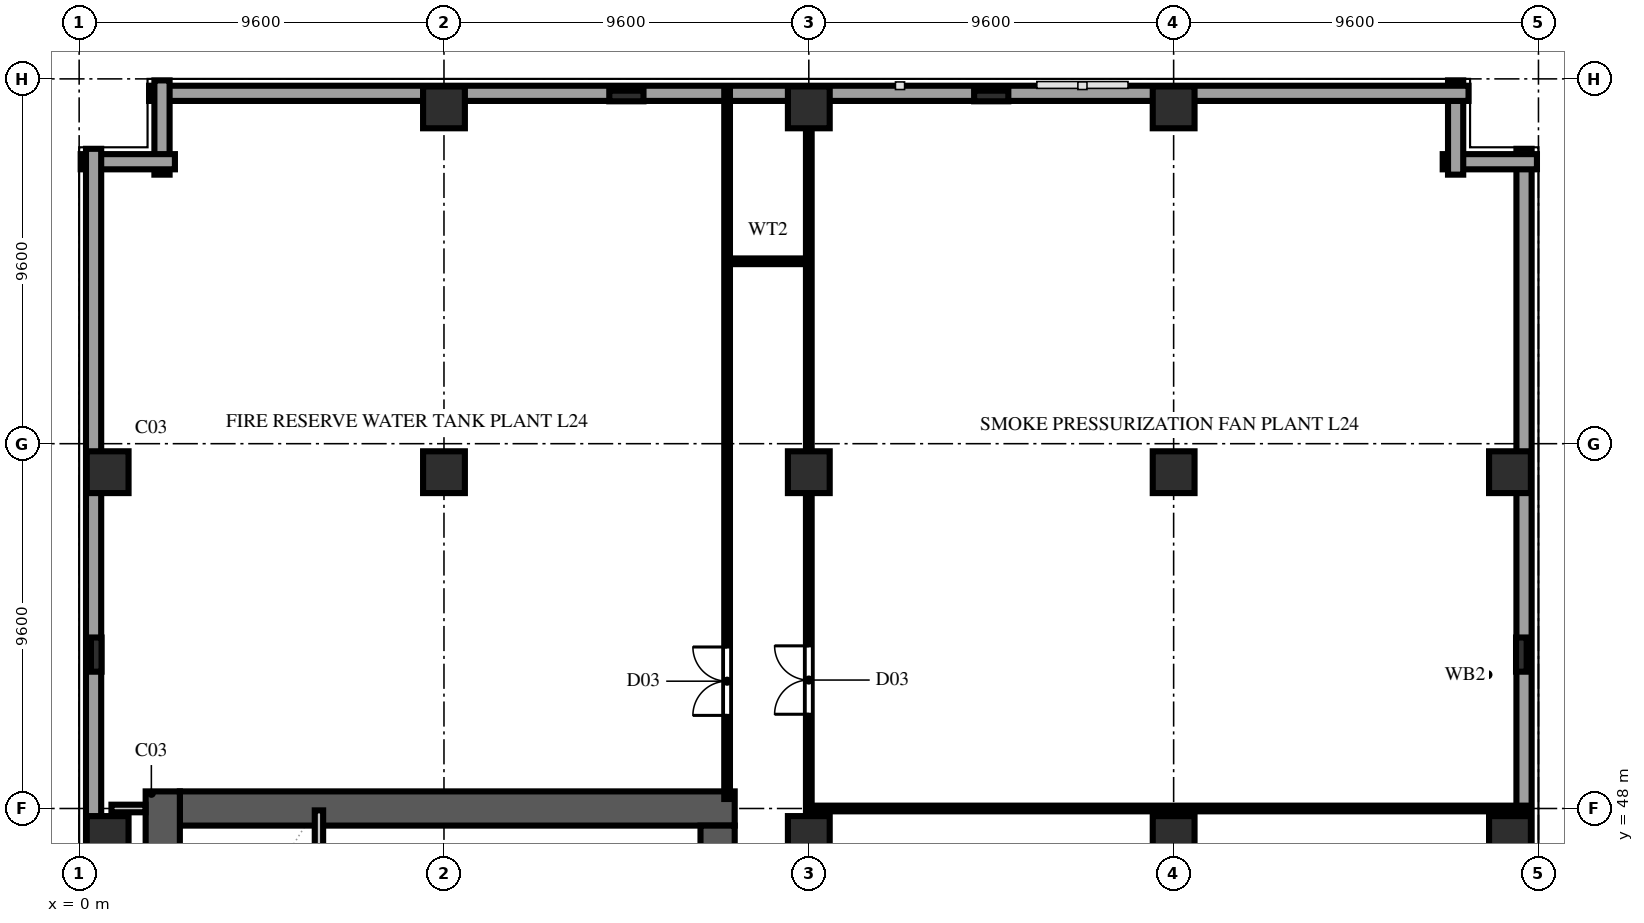
"""IFC4 building model, lengths in metres.
Left out: names, types, materials, properties, quantities, classifications, styles, units other than length and angle.
Written with IfcOpenShell. Run it as: python <this file> out.ifc"""

import sys

from ifc_helpers import new_model, si_unit, direction, frame, frame_2d, origin, origin_2d, place, context, subcontext, project, spatial, rectangle, extrude, element, fill, save


model = new_model("IFC4")
c1 = context("Model", 3, precision=1e-05, world=origin(), true_north=direction((0.0, 1.0)))
c2 = subcontext(c1, "Body", "Model", "MODEL_VIEW")
j1 = project(units=[si_unit("LENGTHUNIT", "METRE"), si_unit("PLANEANGLEUNIT", "RADIAN")], contexts=[c1])
p1 = place(None, origin())
s1 = spatial("IfcSite", under=j1, at=p1, CompositionType="ELEMENT")
p2 = place(p1, origin())
s2 = spatial("IfcBuilding", under=s1, at=p2, CompositionType="ELEMENT")
p3 = place(p2, frame((0.0, 0.0, 96.4)))
s3 = spatial("IfcBuildingStorey", under=s2, at=p3, CompositionType="ELEMENT", Elevation=96.4)
p4 = place(p3, frame((2.65, 48.0, 0.0), z_axis=(0.0, 0.0, 1.0), x_axis=(1.0, 0.0, 0.0)))
e1 = element("IfcWall", 1, at=p4, inside=s3, PredefinedType="SHEAR", context=c2, shape_type="SweptSolid", body=[
    extrude(rectangle(XDim=14.6, YDim=0.9, at=frame_2d((7.3, 0.0))), origin(), (0.0, 0.0, 1.0), 4.74),
])
p5 = place(p3, frame((2.2, 9.15, 0.0), z_axis=(0.0, 0.0, 1.0), x_axis=(0.0, 1.0, 0.0)))
e2 = element("IfcWall", 2, at=p5, inside=s3, PredefinedType="SHEAR", context=c2, shape_type="SweptSolid", body=[
    extrude(rectangle(XDim=39.3, YDim=0.9, at=frame_2d((19.65, 0.0))), origin(), (0.0, 0.0, 1.0), 4.74),
])
p6 = place(p3, frame((16.8, 36.4, 0.0), z_axis=(0.0, 0.0, 1.0), x_axis=(0.0, 1.0, 0.0)))
e3 = element("IfcWall", 3, at=p6, inside=s3, PredefinedType="SHEAR", context=c2, shape_type="SweptSolid", body=[
    extrude(rectangle(XDim=11.15, YDim=0.9, at=frame_2d((5.575, 0.0))), origin(), (0.0, 0.0, 1.0), 4.74),
])
p7 = place(p6, frame((9.2, 0.0, 0.0)))
e4 = element("IfcOpeningElement", 4, at=p7, cuts=e3, PredefinedType="OPENING", context=c2, shape_type="SweptSolid", body=[
    extrude(rectangle(XDim=0.95, YDim=2.15, at=frame_2d((0.475, 1.075))), frame((0.0, 0.462, 0.0), z_axis=(0.0, -1.0, 0.0), x_axis=(1.0, 0.0, 0.0)), (0.0, 0.0, 1.0), 0.924),
])
for number, where, z_axis, x_axis in (
    (5, (0.75, 47.25, 0.0), (0.0, 0.0, 1.0), (1.0, 0.0, 0.0)),
    (6, (0.75, 56.85, 0.0), (0.0, 0.0, 1.0), (1.0, 0.0, 0.0)),
    (7, (9.6, 56.85, 0.0), (0.0, 0.0, 1.0), (1.0, 0.0, 0.0)),
    (8, (9.6, 66.45, 0.0), (0.0, 0.0, 1.0), (1.0, 0.0, 0.0)),
    (9, (19.2, 47.25, 0.0), (0.0, 0.0, 1.0), (1.0, 0.0, 0.0)),
    (10, (19.2, 56.85, 0.0), (0.0, 0.0, 1.0), (1.0, 0.0, 0.0)),
    (11, (19.2, 66.45, 0.0), (0.0, 0.0, 1.0), (1.0, 0.0, 0.0)),
    (12, (28.8, 47.25, 0.0), (0.0, 0.0, 1.0), (1.0, 0.0, 0.0)),
    (13, (28.8, 56.85, 0.0), (0.0, 0.0, 1.0), (1.0, 0.0, 0.0)),
    (14, (28.8, 66.45, 0.0), (0.0, 0.0, 1.0), (1.0, 0.0, 0.0)),
    (15, (37.65, 47.25, 0.0), (0.0, 0.0, 1.0), (1.0, 0.0, 0.0)),
    (16, (37.65, 56.85, 0.0), (0.0, 0.0, 1.0), (1.0, 0.0, 0.0)),
):
    element("IfcColumn", number, at=place(p3, frame(where, z_axis=z_axis, x_axis=x_axis)), inside=s3, PredefinedType="COLUMN", context=c2, shape_type="SweptSolid", body=[
        extrude(rectangle(XDim=1.1, YDim=1.1, at=origin_2d()), origin(), (0.0, 0.0, 1.0), 5.0),
    ])
for number, where, z_axis, x_axis in (
    (17, (0.45, 52.05, 0.0), (0.0, 0.0, 1.0), (0.0, 1.0, 0.0)),
    (18, (14.4, 66.75, 0.0), (0.0, 0.0, 1.0), (1.0, 0.0, 0.0)),
    (19, (24.0, 66.75, 0.0), (0.0, 0.0, 1.0), (1.0, 0.0, 0.0)),
    (20, (37.95, 52.05, 0.0), (0.0, 0.0, 1.0), (0.0, 1.0, 0.0)),
):
    element("IfcColumn", number, at=place(p3, frame(where, z_axis=z_axis, x_axis=x_axis)), inside=s3, PredefinedType="PILASTER", context=c2, shape_type="SweptSolid", body=[
        extrude(rectangle(XDim=0.9, YDim=0.28, at=origin_2d()), origin(), (0.0, 0.0, 1.0), 5.0),
    ])
p8 = place(p3, frame((38.02, 37.68, 0.0), z_axis=(0.0, 0.0, 1.0), x_axis=(0.0, 1.0, 0.0)))
e21 = element("IfcWall", 21, at=p8, inside=s3, PredefinedType="SOLIDWALL", context=c2, shape_type="SweptSolid", body=[
    extrude(rectangle(XDim=27.68, YDim=0.4, at=frame_2d((13.84, 0.0))), origin(), (0.0, 0.0, 1.0), 4.74),
])
p9 = place(p3, frame((38.36, 65.02, 0.0), z_axis=(0.0, 0.0, 1.0), x_axis=(-1.0, 0.0, 0.0)))
e22 = element("IfcWall", 22, at=p9, inside=s3, PredefinedType="SOLIDWALL", context=c2, shape_type="SweptSolid", body=[
    extrude(rectangle(XDim=2.48, YDim=0.4, at=frame_2d((1.24, 0.0))), origin(), (0.0, 0.0, 1.0), 4.74),
])
p10 = place(p3, frame((36.22, 64.68, 0.0), z_axis=(0.0, 0.0, 1.0), x_axis=(0.0, 1.0, 0.0)))
e23 = element("IfcWall", 23, at=p10, inside=s3, PredefinedType="SOLIDWALL", context=c2, shape_type="SweptSolid", body=[
    extrude(rectangle(XDim=2.48, YDim=0.4, at=frame_2d((1.24, 0.0))), origin(), (0.0, 0.0, 1.0), 4.74),
])
p11 = place(p3, frame((36.56, 66.82, 0.0), z_axis=(0.0, 0.0, 1.0), x_axis=(-1.0, 0.0, 0.0)))
e24 = element("IfcWall", 24, at=p11, inside=s3, PredefinedType="SOLIDWALL", context=c2, shape_type="SweptSolid", body=[
    extrude(rectangle(XDim=34.72, YDim=0.4, at=frame_2d((17.36, 0.0))), origin(), (0.0, 0.0, 1.0), 4.74),
])
for number, where, z_axis, x_axis in (
    (25, (2.18, 67.16, 0.0), (0.0, 0.0, 1.0), (0.0, -1.0, 0.0)),
    (26, (2.52, 65.02, 0.0), (0.0, 0.0, 1.0), (-1.0, 0.0, 0.0)),
):
    element("IfcWall", number, at=place(p3, frame(where, z_axis=z_axis, x_axis=x_axis)), inside=s3, PredefinedType="SOLIDWALL", context=c2, shape_type="SweptSolid", body=[
        extrude(rectangle(XDim=2.48, YDim=0.4, at=frame_2d((1.24, 0.0))), origin(), (0.0, 0.0, 1.0), 4.74),
    ])
p12 = place(p3, frame((0.38, 65.36, 0.0), z_axis=(0.0, 0.0, 1.0), x_axis=(0.0, -1.0, 0.0)))
e27 = element("IfcWall", 27, at=p12, inside=s3, PredefinedType="SOLIDWALL", context=c2, shape_type="SweptSolid", body=[
    extrude(rectangle(XDim=63.52, YDim=0.4, at=frame_2d((31.76, 0.0))), origin(), (0.0, 0.0, 1.0), 4.74),
])
p13 = place(p3, frame((6.31, 40.14, 0.0), z_axis=(0.0, 0.0, 1.0), x_axis=(0.0, 1.0, 0.0)))
e28 = element("IfcWall", 28, at=p13, inside=s3, PredefinedType="SOLIDWALL", context=c2, shape_type="SweptSolid", body=[
    extrude(rectangle(XDim=7.81, YDim=0.22, at=frame_2d((3.905, 0.0))), origin(), (0.0, 0.0, 1.0), 4.74),
])
p14 = place(p3, frame((0.85, 48.0, 0.0), z_axis=(0.0, 0.0, 1.0), x_axis=(1.0, 0.0, 0.0)))
e29 = element("IfcWall", 29, at=p14, inside=s3, PredefinedType="SOLIDWALL", context=c2, shape_type="SweptSolid", body=[
    extrude(rectangle(XDim=0.895, YDim=0.2, at=frame_2d((0.448, 0.0))), origin(), (0.0, 0.0, 1.0), 4.74),
])
p15 = place(p3, frame((17.05, 62.4, 0.0), z_axis=(0.0, 0.0, 1.0), x_axis=(1.0, 0.0, 0.0)))
e30 = element("IfcWall", 30, at=p15, inside=s3, PredefinedType="PARTITIONING", context=c2, shape_type="SweptSolid", body=[
    extrude(rectangle(XDim=2.15, YDim=0.15, at=frame_2d((1.075, 0.0))), origin(), (0.0, 0.0, 1.0), 4.74),
])
p16 = place(p3, frame((19.2, 48.0, 0.0), z_axis=(0.0, 0.0, 1.0), x_axis=(1.0, 0.0, 0.0)))
e31 = element("IfcWall", 31, at=p16, inside=s3, PredefinedType="PARTITIONING", context=c2, shape_type="SweptSolid", body=[
    extrude(rectangle(XDim=18.98, YDim=0.15, at=frame_2d((9.49, 0.0))), origin(), (0.0, 0.0, 1.0), 4.74),
])
p17 = place(p3, frame((19.2, 9.98, 0.0), z_axis=(0.0, 0.0, 1.0), x_axis=(0.0, 1.0, 0.0)))
e32 = element("IfcWall", 32, at=p17, inside=s3, PredefinedType="PARTITIONING", context=c2, shape_type="SweptSolid", body=[
    extrude(rectangle(XDim=56.47, YDim=0.15, at=frame_2d((28.235, 0.0))), origin(), (0.0, 0.0, 1.0), 3.967),
])
p18 = place(p17, frame((2.0, 0.0, 0.0)))
e33 = element("IfcOpeningElement", 33, at=p18, cuts=e32, PredefinedType="OPENING", context=c2, shape_type="SweptSolid", body=[
    extrude(rectangle(XDim=1.8, YDim=2.2, at=frame_2d((0.9, 1.1))), frame((0.0, 0.087, 0.0), z_axis=(0.0, -1.0, 0.0), x_axis=(1.0, 0.0, 0.0)), (0.0, 0.0, 1.0), 0.174),
])
p19 = place(p17, frame((12.0, 0.0, 0.0)))
e34 = element("IfcOpeningElement", 34, at=p19, cuts=e32, PredefinedType="OPENING", context=c2, shape_type="SweptSolid", body=[
    extrude(rectangle(XDim=1.8, YDim=2.2, at=frame_2d((0.9, 1.1))), frame((0.0, 0.087, 0.0), z_axis=(0.0, -1.0, 0.0), x_axis=(1.0, 0.0, 0.0)), (0.0, 0.0, 1.0), 0.174),
])
p20 = place(p17, frame((30.5, 0.0, 0.0)))
e35 = element("IfcOpeningElement", 35, at=p20, cuts=e32, PredefinedType="OPENING", context=c2, shape_type="SweptSolid", body=[
    extrude(rectangle(XDim=1.2, YDim=2.2, at=frame_2d((0.6, 1.1))), frame((0.0, 0.087, 0.0), z_axis=(0.0, -1.0, 0.0), x_axis=(1.0, 0.0, 0.0)), (0.0, 0.0, 1.0), 0.174),
])
p21 = place(p17, frame((40.5, 0.0, 0.0)))
e36 = element("IfcOpeningElement", 36, at=p21, cuts=e32, PredefinedType="OPENING", context=c2, shape_type="SweptSolid", body=[
    extrude(rectangle(XDim=1.8, YDim=2.2, at=frame_2d((0.9, 1.1))), frame((0.0, 0.087, 0.0), z_axis=(0.0, -1.0, 0.0), x_axis=(1.0, 0.0, 0.0)), (0.0, 0.0, 1.0), 0.174),
])
p22 = place(p3, frame((19.2, 66.45, 0.0), z_axis=(0.0, 0.0, 1.0), x_axis=(0.0, 1.0, 0.0)))
e37 = element("IfcWall", 37, at=p22, inside=s3, PredefinedType="PARTITIONING", context=c2, shape_type="SweptSolid", body=[
    extrude(rectangle(XDim=0.53, YDim=0.15, at=frame_2d((0.265, 0.0))), origin(), (0.0, 0.0, 1.0), 4.74),
])
p23 = place(p3, frame((17.05, 48.25, 0.0), z_axis=(0.0, 0.0, 1.0), x_axis=(0.0, 1.0, 0.0)))
e38 = element("IfcWall", 38, at=p23, inside=s3, PredefinedType="PARTITIONING", context=c2, shape_type="SweptSolid", body=[
    extrude(rectangle(XDim=18.73, YDim=0.15, at=frame_2d((9.365, 0.0))), origin(), (0.0, 0.0, 1.0), 4.74),
])
p24 = place(p23, frame((2.2, 0.0, 0.0)))
e39 = element("IfcOpeningElement", 39, at=p24, cuts=e38, PredefinedType="OPENING", context=c2, shape_type="SweptSolid", body=[
    extrude(rectangle(XDim=1.8, YDim=2.2, at=frame_2d((0.9, 1.1))), frame((0.0, 0.087, 0.0), z_axis=(0.0, -1.0, 0.0), x_axis=(1.0, 0.0, 0.0)), (0.0, 0.0, 1.0), 0.174),
])
p25 = place(p21, origin())
e40 = element("IfcDoor", 40, at=p25, inside=s3, OperationType="DOUBLE_DOOR_SINGLE_SWING", PredefinedType="DOOR", context=c2, shape_type="SweptSolid", body=[
    extrude(rectangle(XDim=1.8, YDim=2.2, at=frame_2d((0.9, 1.1))), frame((0.0, 0.025, 0.0), z_axis=(0.0, -1.0, 0.0), x_axis=(1.0, 0.0, 0.0)), (0.0, 0.0, 1.0), 0.05),
])
fill(e36, e40)
p26 = place(p24, origin())
e41 = element("IfcDoor", 41, at=p26, inside=s3, OperationType="DOUBLE_DOOR_SINGLE_SWING", PredefinedType="DOOR", context=c2, shape_type="SweptSolid", body=[
    extrude(rectangle(XDim=1.8, YDim=2.2, at=frame_2d((0.9, 1.1))), frame((0.0, 0.025, 0.0), z_axis=(0.0, -1.0, 0.0), x_axis=(1.0, 0.0, 0.0)), (0.0, 0.0, 1.0), 0.05),
])
fill(e39, e41)
save(model, sys.argv[1])
